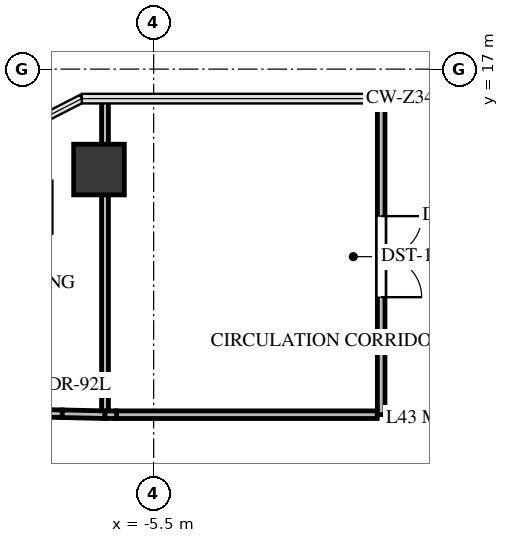
"""IFC4 building model, lengths in metres.
Left out: names, types, materials, properties, quantities, classifications, styles, units other than length and angle.
Written with IfcOpenShell. Run it as: python <this file> out.ifc"""

import sys

from ifc_helpers import new_model, si_unit, direction, frame, frame_2d, origin, origin_2d, place, context, subcontext, project, spatial, rectangle, extrude, source, transform, mapped, element, fill, save


model = new_model("IFC4")
c1 = context("Model", 3, precision=1e-05, world=origin(), true_north=direction((0.0, 1.0)))
c2 = subcontext(c1, "Body", "Model", "MODEL_VIEW")
j1 = project(units=[si_unit("LENGTHUNIT", "METRE"), si_unit("PLANEANGLEUNIT", "RADIAN")], contexts=[c1])
p1 = place(None, origin())
s1 = spatial("IfcSite", under=j1, at=p1, CompositionType="ELEMENT")
p2 = place(p1, origin())
s2 = spatial("IfcBuilding", under=s1, at=p2, CompositionType="ELEMENT")
p3 = place(p2, frame((0.0, 0.0, 159.3)))
s3 = spatial("IfcBuildingStorey", under=s2, at=p3, CompositionType="ELEMENT", Elevation=159.3)
m1 = source(origin(), c2, "Body", "SweptSolid", [
    extrude(rectangle(XDim=1.0, YDim=1.0, at=origin_2d()), origin(), (0.0, 0.0, 1.0), 3.22),
])
p4 = place(p3, frame((-6.579, 15.018, -0.24), z_axis=(0.0, 0.0, 1.0), x_axis=(1.0, 0.0, 0.0)))
e1 = element("IfcColumn", 1, at=p4, inside=s3, PredefinedType="COLUMN", context=c2, shape_type="MappedRepresentation", body=[
    mapped(m1, transform((0.0, 0.0, 0.0), x_axis=(1.0, 0.0, 0.0), y_axis=(0.0, 1.0, 0.0), z_axis=(0.0, 0.0, 1.0), scale=1.0)),
])
p5 = place(p3, frame((-7.304, 10.199, 0.0), z_axis=(0.0, 0.0, 1.0), x_axis=(-0.99975438671, 0.022162270975, 0.0)))
e2 = element("IfcWall", 2, at=p5, inside=s3, PredefinedType="PARTITIONING", context=c2, shape_type="SweptSolid", body=[
    extrude(rectangle(XDim=5.277, YDim=0.15, at=frame_2d((2.638, 0.0))), origin(), (0.0, 0.0, 1.0), 2.319),
])
p6 = place(p5, frame((0.35, 0.0, 0.0)))
e3 = element("IfcOpeningElement", 3, at=p6, cuts=e2, PredefinedType="OPENING", context=c2, shape_type="SweptSolid", body=[
    extrude(rectangle(XDim=0.92, YDim=2.1, at=frame_2d((0.46, 1.05))), frame((0.0, 0.085, 0.0), z_axis=(0.0, -1.0, 0.0), x_axis=(1.0, 0.0, 0.0)), (0.0, 0.0, 1.0), 0.17),
])
p7 = place(p3, frame((-6.46, 10.18, 0.0), z_axis=(0.0, 0.0, 1.0), x_axis=(-0.99975203457, 0.022268124577, 0.0)))
e4 = element("IfcWall", 4, at=p7, inside=s3, PredefinedType="PARTITIONING", context=c2, shape_type="SweptSolid", body=[
    extrude(rectangle(XDim=0.844, YDim=0.15, at=frame_2d((0.422, 0.0))), origin(), (0.0, 0.0, 1.0), 2.162),
])
p8 = place(p3, frame((-1.01, 16.418, 0.0), z_axis=(0.0, 0.0, 1.0), x_axis=(0.0, -1.0, 0.0)))
e5 = element("IfcWall", 5, at=p8, inside=s3, PredefinedType="PARTITIONING", context=c2, shape_type="SweptSolid", body=[
    extrude(rectangle(XDim=6.238, YDim=0.15, at=frame_2d((3.119, 0.0))), origin(), (0.0, 0.0, 1.0), 2.319),
])
p9 = place(p8, frame((2.319, 0.0, 0.0)))
e6 = element("IfcOpeningElement", 6, at=p9, cuts=e5, PredefinedType="OPENING", context=c2, shape_type="SweptSolid", body=[
    extrude(rectangle(XDim=1.6, YDim=2.15, at=frame_2d((0.8, 1.075))), frame((0.0, 0.085, 0.0), z_axis=(0.0, -1.0, 0.0), x_axis=(1.0, 0.0, 0.0)), (0.0, 0.0, 1.0), 0.17),
])
p10 = place(p3, frame((-1.089, 10.18, 0.0), z_axis=(0.0, 0.0, 1.0), x_axis=(-1.0, 0.0, 0.0)))
e7 = element("IfcWall", 7, at=p10, inside=s3, PredefinedType="PARTITIONING", context=c2, shape_type="SweptSolid", body=[
    extrude(rectangle(XDim=5.144, YDim=0.15, at=frame_2d((2.572, 0.0))), origin(), (0.0, 0.0, 1.0), 2.528),
])
p11 = place(p3, frame((-6.233, 10.18, 0.0), z_axis=(0.0, 0.0, 1.0), x_axis=(-1.0, 0.0, 0.0)))
e8 = element("IfcWall", 8, at=p11, inside=s3, PredefinedType="PARTITIONING", context=c2, shape_type="SweptSolid", body=[
    extrude(rectangle(XDim=0.227, YDim=0.15, at=frame_2d((0.114, 0.0))), origin(), (0.0, 0.0, 1.0), 2.162),
])
p12 = place(p3, frame((-6.46, 16.418, 0.0), z_axis=(0.0, 0.0, 1.0), x_axis=(0.0, -1.0, 0.0)))
e9 = element("IfcWall", 9, at=p12, inside=s3, PredefinedType="PARTITIONING", context=c2, shape_type="SweptSolid", body=[
    extrude(rectangle(XDim=1.316, YDim=0.135, at=frame_2d((0.658, 0.0))), origin(), (0.0, 0.0, 1.0), 1.797),
])
p13 = place(p3, frame((-6.46, 15.079, 0.0), z_axis=(0.0, 0.0, 1.0), x_axis=(0.0, -1.0, 0.0)))
e10 = element("IfcWall", 10, at=p13, inside=s3, PredefinedType="PARTITIONING", context=c2, shape_type="SweptSolid", body=[
    extrude(rectangle(XDim=4.82, YDim=0.135, at=frame_2d((2.41, 0.0))), origin(), (0.0, 0.0, 1.0), 2.162),
])
m2 = source(origin(), c2, "Body", "SweptSolid", [
    extrude(rectangle(XDim=1.6, YDim=2.15, at=frame_2d((0.8, 1.075))), frame((0.0, 0.025, 0.0), z_axis=(0.0, -1.0, 0.0), x_axis=(1.0, 0.0, 0.0)), (0.0, 0.0, 1.0), 0.05),
])
p14 = place(p9, origin())
e11 = element("IfcDoor", 11, at=p14, inside=s3, OperationType="DOUBLE_DOOR_SINGLE_SWING", PredefinedType="DOOR", context=c2, shape_type="MappedRepresentation", body=[
    mapped(m2, transform((0.0, 0.0, 0.0), x_axis=(1.0, 0.0, 0.0), y_axis=(0.0, 1.0, 0.0), z_axis=(0.0, 0.0, 1.0), scale=1.0)),
])
fill(e6, e11)
save(model, sys.argv[1])
